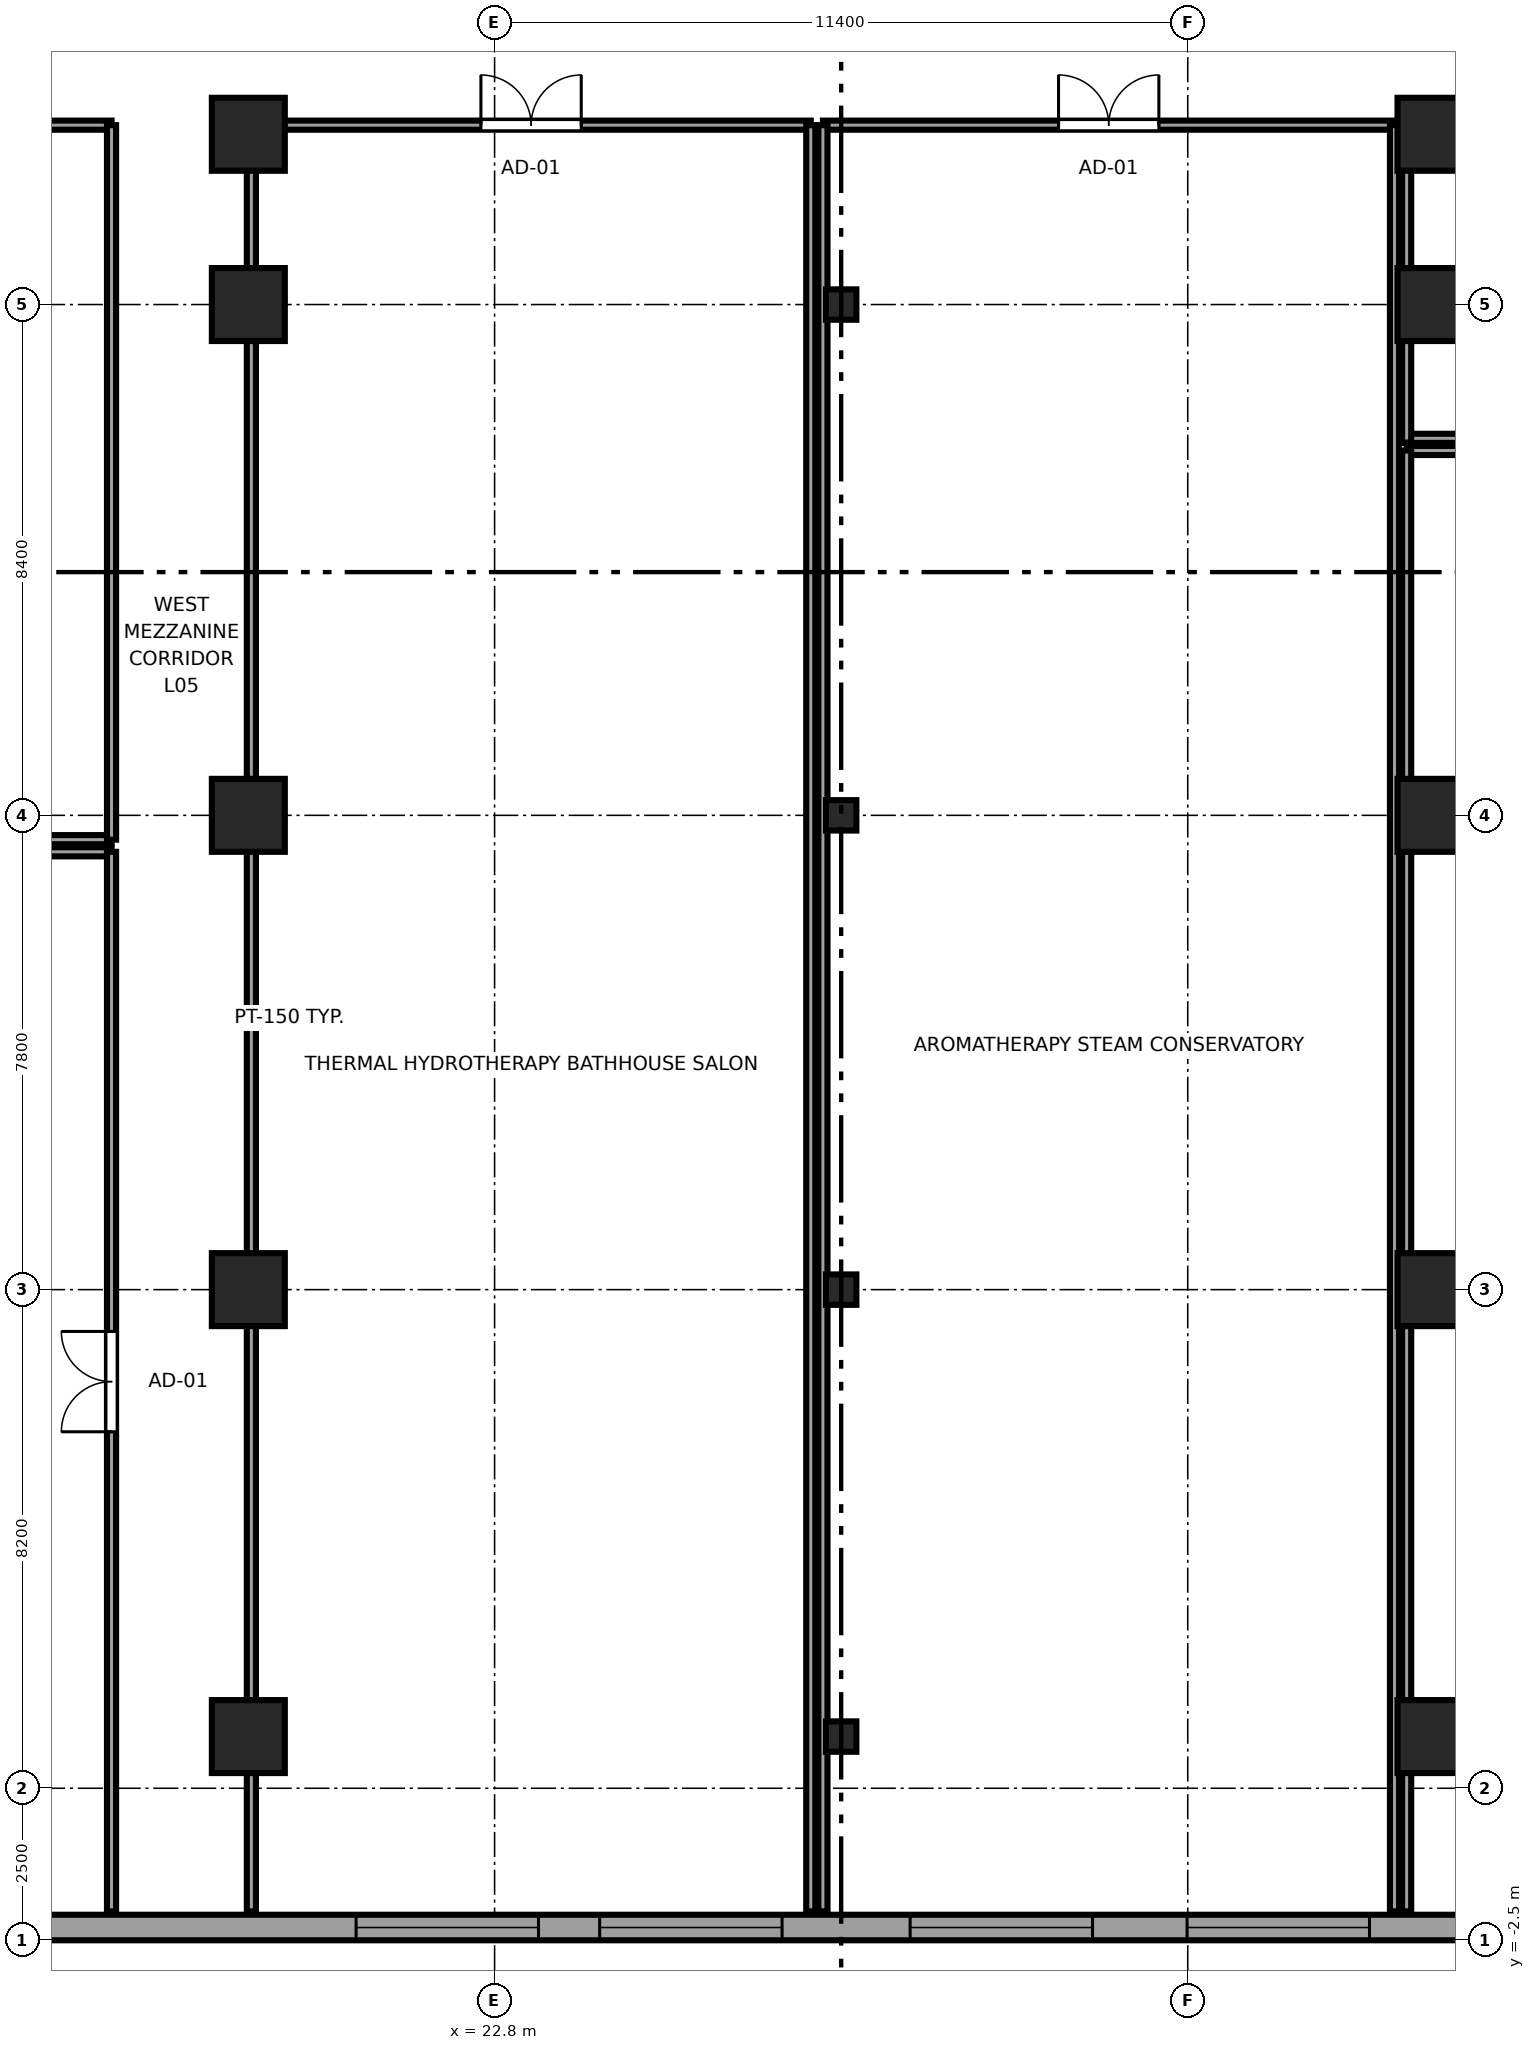
"""IFC4 building model, lengths in metres.
Left out: names, types, materials, properties, quantities, classifications, styles, units other than length and angle.
Written with IfcOpenShell. Run it as: python <this file> out.ifc"""

import sys

from ifc_helpers import new_model, si_unit, direction, frame, frame_2d, origin, origin_2d, place, context, subcontext, project, spatial, rectangle, i_section, extrude, source, transform, mapped, element, fill, save


model = new_model("IFC4")
c1 = context("Model", 3, precision=1e-05, world=origin(), true_north=direction((0.0, 1.0)))
c2 = subcontext(c1, "Body", "Model", "MODEL_VIEW")
j1 = project(units=[si_unit("LENGTHUNIT", "METRE"), si_unit("PLANEANGLEUNIT", "RADIAN")], contexts=[c1])
p1 = place(None, origin())
s1 = spatial("IfcSite", under=j1, at=p1, CompositionType="ELEMENT")
p2 = place(p1, origin())
s2 = spatial("IfcBuilding", under=s1, at=p2, CompositionType="ELEMENT")
p3 = place(p2, frame((0.0, 0.0, 26.8)))
s3 = spatial("IfcBuildingStorey", under=s2, at=p3, CompositionType="ELEMENT", Elevation=26.8)
m1 = source(origin(), c2, "Body", "SweptSolid", [
    extrude(rectangle(XDim=1.2, YDim=1.2, at=origin_2d()), origin(), (0.0, 0.0, 1.0), 5.2),
])
for number, where, z_axis, x_axis in (
    (1, (18.75, 0.85, 0.0), (0.0, 0.0, 1.0), (1.0, 0.0, 0.0)),
    (2, (38.25, 0.85, 0.0), (0.0, 0.0, 1.0), (1.0, 0.0, 0.0)),
    (3, (18.75, 8.2, 0.0), (0.0, 0.0, 1.0), (1.0, 0.0, 0.0)),
    (4, (38.25, 8.2, 0.0), (0.0, 0.0, 1.0), (1.0, 0.0, 0.0)),
    (5, (18.75, 16.0, 0.0), (0.0, 0.0, 1.0), (1.0, 0.0, 0.0)),
    (6, (38.25, 16.0, 0.0), (0.0, 0.0, 1.0), (1.0, 0.0, 0.0)),
    (7, (18.75, 24.4, 0.0), (0.0, 0.0, 1.0), (1.0, 0.0, 0.0)),
    (8, (38.25, 24.4, 0.0), (0.0, 0.0, 1.0), (1.0, 0.0, 0.0)),
    (9, (18.75, 27.2, 0.0), (0.0, 0.0, 1.0), (1.0, 0.0, 0.0)),
    (10, (38.25, 27.2, 0.0), (0.0, 0.0, 1.0), (1.0, 0.0, 0.0)),
):
    element("IfcColumn", number, at=place(p3, frame(where, z_axis=z_axis, x_axis=x_axis)), inside=s3, PredefinedType="COLUMN", context=c2, shape_type="MappedRepresentation", body=[
        mapped(m1, transform((0.0, 0.0, 0.0), x_axis=(1.0, 0.0, 0.0), y_axis=(0.0, 1.0, 0.0), z_axis=(0.0, 0.0, 1.0), scale=1.0)),
    ])
m2 = source(origin(), c2, "Body", "SweptSolid", [
    extrude(i_section(OverallWidth=0.5, OverallDepth=0.5, WebThickness=0.028, FlangeThickness=0.045, at=origin_2d()), origin(), (0.0, 0.0, 1.0), 5.2),
])
for number, where, z_axis, x_axis in (
    (11, (28.5, 0.85, 0.0), (0.0, 0.0, 1.0), (1.0, 0.0, 0.0)),
    (12, (28.5, 8.2, 0.0), (0.0, 0.0, 1.0), (1.0, 0.0, 0.0)),
    (13, (28.5, 16.0, 0.0), (0.0, 0.0, 1.0), (1.0, 0.0, 0.0)),
    (14, (28.5, 24.4, 0.0), (0.0, 0.0, 1.0), (1.0, 0.0, 0.0)),
):
    element("IfcColumn", number, at=place(p3, frame(where, z_axis=z_axis, x_axis=x_axis)), inside=s3, PredefinedType="COLUMN", context=c2, shape_type="MappedRepresentation", body=[
        mapped(m2, transform((0.0, 0.0, 0.0), x_axis=(1.0, 0.0, 0.0), y_axis=(0.0, 1.0, 0.0), z_axis=(0.0, 0.0, 1.0), scale=1.0)),
    ])
p4 = place(p3, frame((-8.19, -2.29, 0.0), z_axis=(0.0, 0.0, 1.0), x_axis=(1.0, 0.0, 0.0)))
e15 = element("IfcWall", 15, at=p4, inside=s3, PredefinedType="SOLIDWALL", context=c2, shape_type="SweptSolid", body=[
    extrude(rectangle(XDim=64.98, YDim=0.42, at=frame_2d((32.49, 0.0))), origin(), (0.0, 0.0, 1.0), 4.94),
])
p5 = place(p4, frame((1.378, 0.0, 0.65)))
e16 = element("IfcOpeningElement", 16, at=p5, cuts=e15, PredefinedType="OPENING", context=c2, shape_type="SweptSolid", body=[
    extrude(rectangle(XDim=3.0, YDim=2.5, at=frame_2d((1.5, 1.25))), frame((0.0, 0.22, 0.0), z_axis=(0.0, -1.0, 0.0), x_axis=(1.0, 0.0, 0.0)), (0.0, 0.0, 1.0), 0.44),
])
p6 = place(p4, frame((4.884, 0.0, 0.65)))
e17 = element("IfcOpeningElement", 17, at=p6, cuts=e15, PredefinedType="OPENING", context=c2, shape_type="SweptSolid", body=[
    extrude(rectangle(XDim=3.0, YDim=2.5, at=frame_2d((1.5, 1.25))), frame((0.0, 0.22, 0.0), z_axis=(0.0, -1.0, 0.0), x_axis=(1.0, 0.0, 0.0)), (0.0, 0.0, 1.0), 0.44),
])
p7 = place(p4, frame((10.489, 0.0, 0.65)))
e18 = element("IfcOpeningElement", 18, at=p7, cuts=e15, PredefinedType="OPENING", context=c2, shape_type="SweptSolid", body=[
    extrude(rectangle(XDim=3.0, YDim=2.5, at=frame_2d((1.5, 1.25))), frame((0.0, 0.22, 0.0), z_axis=(0.0, -1.0, 0.0), x_axis=(1.0, 0.0, 0.0)), (0.0, 0.0, 1.0), 0.44),
])
p8 = place(p4, frame((19.601, 0.0, 0.65)))
e19 = element("IfcOpeningElement", 19, at=p8, cuts=e15, PredefinedType="OPENING", context=c2, shape_type="SweptSolid", body=[
    extrude(rectangle(XDim=3.0, YDim=2.5, at=frame_2d((1.5, 1.25))), frame((0.0, 0.22, 0.0), z_axis=(0.0, -1.0, 0.0), x_axis=(1.0, 0.0, 0.0)), (0.0, 0.0, 1.0), 0.44),
])
p9 = place(p4, frame((28.712, 0.0, 0.65)))
e20 = element("IfcOpeningElement", 20, at=p9, cuts=e15, PredefinedType="OPENING", context=c2, shape_type="SweptSolid", body=[
    extrude(rectangle(XDim=3.0, YDim=2.5, at=frame_2d((1.5, 1.25))), frame((0.0, 0.22, 0.0), z_axis=(0.0, -1.0, 0.0), x_axis=(1.0, 0.0, 0.0)), (0.0, 0.0, 1.0), 0.44),
])
p10 = place(p4, frame((32.718, 0.0, 0.65)))
e21 = element("IfcOpeningElement", 21, at=p10, cuts=e15, PredefinedType="OPENING", context=c2, shape_type="SweptSolid", body=[
    extrude(rectangle(XDim=3.0, YDim=2.5, at=frame_2d((1.5, 1.25))), frame((0.0, 0.22, 0.0), z_axis=(0.0, -1.0, 0.0), x_axis=(1.0, 0.0, 0.0)), (0.0, 0.0, 1.0), 0.44),
])
p11 = place(p4, frame((37.824, 0.0, 0.65)))
e22 = element("IfcOpeningElement", 22, at=p11, cuts=e15, PredefinedType="OPENING", context=c2, shape_type="SweptSolid", body=[
    extrude(rectangle(XDim=3.0, YDim=2.5, at=frame_2d((1.5, 1.25))), frame((0.0, 0.22, 0.0), z_axis=(0.0, -1.0, 0.0), x_axis=(1.0, 0.0, 0.0)), (0.0, 0.0, 1.0), 0.44),
])
p12 = place(p4, frame((42.379, 0.0, 0.65)))
e23 = element("IfcOpeningElement", 23, at=p12, cuts=e15, PredefinedType="OPENING", context=c2, shape_type="SweptSolid", body=[
    extrude(rectangle(XDim=3.0, YDim=2.5, at=frame_2d((1.5, 1.25))), frame((0.0, 0.22, 0.0), z_axis=(0.0, -1.0, 0.0), x_axis=(1.0, 0.0, 0.0)), (0.0, 0.0, 1.0), 0.44),
])
p13 = place(p4, frame((46.935, 0.0, 0.65)))
e24 = element("IfcOpeningElement", 24, at=p13, cuts=e15, PredefinedType="OPENING", context=c2, shape_type="SweptSolid", body=[
    extrude(rectangle(XDim=3.0, YDim=2.5, at=frame_2d((1.5, 1.25))), frame((0.0, 0.22, 0.0), z_axis=(0.0, -1.0, 0.0), x_axis=(1.0, 0.0, 0.0)), (0.0, 0.0, 1.0), 0.44),
])
p14 = place(p4, frame((51.491, 0.0, 0.65)))
e25 = element("IfcOpeningElement", 25, at=p14, cuts=e15, PredefinedType="OPENING", context=c2, shape_type="SweptSolid", body=[
    extrude(rectangle(XDim=3.0, YDim=2.5, at=frame_2d((1.5, 1.25))), frame((0.0, 0.22, 0.0), z_axis=(0.0, -1.0, 0.0), x_axis=(1.0, 0.0, 0.0)), (0.0, 0.0, 1.0), 0.44),
])
p15 = place(p4, frame((60.602, 0.0, 0.65)))
e26 = element("IfcOpeningElement", 26, at=p15, cuts=e15, PredefinedType="OPENING", context=c2, shape_type="SweptSolid", body=[
    extrude(rectangle(XDim=3.0, YDim=2.5, at=frame_2d((1.5, 1.25))), frame((0.0, 0.22, 0.0), z_axis=(0.0, -1.0, 0.0), x_axis=(1.0, 0.0, 0.0)), (0.0, 0.0, 1.0), 0.44),
])
p16 = place(p3, frame((-7.925, 15.4, 0.0), z_axis=(0.0, 0.0, 1.0), x_axis=(1.0, 0.0, 0.0)))
e27 = element("IfcWall", 27, at=p16, inside=s3, PredefinedType="PARTITIONING", context=c2, shape_type="SweptSolid", body=[
    extrude(rectangle(XDim=24.425, YDim=0.15, at=frame_2d((12.212, 0.0))), origin(), (0.0, 0.0, 1.0), 4.94),
])
p17 = place(p3, frame((16.5, -2.025, 0.0), z_axis=(0.0, 0.0, 1.0), x_axis=(0.0, 1.0, 0.0)))
e28 = element("IfcWall", 28, at=p17, inside=s3, PredefinedType="PARTITIONING", context=c2, shape_type="SweptSolid", body=[
    extrude(rectangle(XDim=17.425, YDim=0.15, at=frame_2d((8.712, 0.0))), origin(), (0.0, 0.0, 1.0), 4.94),
])
p18 = place(p17, frame((7.887, 0.0, 0.0)))
e29 = element("IfcOpeningElement", 29, at=p18, cuts=e28, PredefinedType="OPENING", context=c2, shape_type="SweptSolid", body=[
    extrude(rectangle(XDim=1.65, YDim=2.15, at=frame_2d((0.825, 1.075))), frame((0.0, 0.085, 0.0), z_axis=(0.0, -1.0, 0.0), x_axis=(1.0, 0.0, 0.0)), (0.0, 0.0, 1.0), 0.17),
])
p19 = place(p3, frame((-7.925, 15.6, 0.0), z_axis=(0.0, 0.0, 1.0), x_axis=(1.0, 0.0, 0.0)))
e30 = element("IfcWall", 30, at=p19, inside=s3, PredefinedType="PARTITIONING", context=c2, shape_type="SweptSolid", body=[
    extrude(rectangle(XDim=24.425, YDim=0.15, at=frame_2d((12.212, 0.0))), origin(), (0.0, 0.0, 1.0), 4.94),
])
p20 = place(p3, frame((-7.925, 27.35, 0.0), z_axis=(0.0, 0.0, 1.0), x_axis=(1.0, 0.0, 0.0)))
e31 = element("IfcWall", 31, at=p20, inside=s3, PredefinedType="PARTITIONING", context=c2, shape_type="SweptSolid", body=[
    extrude(rectangle(XDim=24.425, YDim=0.15, at=frame_2d((12.212, 0.0))), origin(), (0.0, 0.0, 1.0), 4.94),
])
p21 = place(p20, frame((11.387, 0.0, 0.0)))
e32 = element("IfcOpeningElement", 32, at=p21, cuts=e31, PredefinedType="OPENING", context=c2, shape_type="SweptSolid", body=[
    extrude(rectangle(XDim=1.65, YDim=2.15, at=frame_2d((0.825, 1.075))), frame((0.0, 0.085, 0.0), z_axis=(0.0, -1.0, 0.0), x_axis=(1.0, 0.0, 0.0)), (0.0, 0.0, 1.0), 0.17),
])
p22 = place(p3, frame((16.5, 15.6, 0.0), z_axis=(0.0, 0.0, 1.0), x_axis=(0.0, 1.0, 0.0)))
e33 = element("IfcWall", 33, at=p22, inside=s3, PredefinedType="PARTITIONING", context=c2, shape_type="SweptSolid", body=[
    extrude(rectangle(XDim=11.75, YDim=0.15, at=frame_2d((5.875, 0.0))), origin(), (0.0, 0.0, 1.0), 4.94),
])
p23 = place(p3, frame((18.8, 27.35, 0.0), z_axis=(0.0, 0.0, 1.0), x_axis=(1.0, 0.0, 0.0)))
e34 = element("IfcWall", 34, at=p23, inside=s3, PredefinedType="PARTITIONING", context=c2, shape_type="SweptSolid", body=[
    extrude(rectangle(XDim=9.2, YDim=0.15, at=frame_2d((4.6, 0.0))), origin(), (0.0, 0.0, 1.0), 4.94),
])
p24 = place(p23, frame((3.775, 0.0, 0.0)))
e35 = element("IfcOpeningElement", 35, at=p24, cuts=e34, PredefinedType="OPENING", context=c2, shape_type="SweptSolid", body=[
    extrude(rectangle(XDim=1.65, YDim=2.15, at=frame_2d((0.825, 1.075))), frame((0.0, 0.085, 0.0), z_axis=(0.0, -1.0, 0.0), x_axis=(1.0, 0.0, 0.0)), (0.0, 0.0, 1.0), 0.17),
])
p25 = place(p3, frame((18.8, -2.025, 0.0), z_axis=(0.0, 0.0, 1.0), x_axis=(0.0, 1.0, 0.0)))
e36 = element("IfcWall", 36, at=p25, inside=s3, PredefinedType="PARTITIONING", context=c2, shape_type="SweptSolid", body=[
    extrude(rectangle(XDim=29.375, YDim=0.15, at=frame_2d((14.688, 0.0))), origin(), (0.0, 0.0, 1.0), 4.114),
])
p26 = place(p3, frame((28.0, -2.025, 0.0), z_axis=(0.0, 0.0, 1.0), x_axis=(0.0, 1.0, 0.0)))
e37 = element("IfcWall", 37, at=p26, inside=s3, PredefinedType="PARTITIONING", context=c2, shape_type="SweptSolid", body=[
    extrude(rectangle(XDim=29.375, YDim=0.15, at=frame_2d((14.688, 0.0))), origin(), (0.0, 0.0, 1.0), 4.94),
])
p27 = place(p3, frame((28.2, 27.35, 0.0), z_axis=(0.0, 0.0, 1.0), x_axis=(1.0, 0.0, 0.0)))
e38 = element("IfcWall", 38, at=p27, inside=s3, PredefinedType="PARTITIONING", context=c2, shape_type="SweptSolid", body=[
    extrude(rectangle(XDim=9.4, YDim=0.15, at=frame_2d((4.7, 0.0))), origin(), (0.0, 0.0, 1.0), 4.94),
])
p28 = place(p27, frame((3.875, 0.0, 0.0)))
e39 = element("IfcOpeningElement", 39, at=p28, cuts=e38, PredefinedType="OPENING", context=c2, shape_type="SweptSolid", body=[
    extrude(rectangle(XDim=1.65, YDim=2.15, at=frame_2d((0.825, 1.075))), frame((0.0, 0.085, 0.0), z_axis=(0.0, -1.0, 0.0), x_axis=(1.0, 0.0, 0.0)), (0.0, 0.0, 1.0), 0.17),
])
for number, where, z_axis, x_axis in (
    (40, (28.2, -2.025, 0.0), (0.0, 0.0, 1.0), (0.0, 1.0, 0.0)),
    (41, (37.6, -2.025, 0.0), (0.0, 0.0, 1.0), (0.0, 1.0, 0.0)),
):
    element("IfcWall", number, at=place(p3, frame(where, z_axis=z_axis, x_axis=x_axis)), inside=s3, PredefinedType="PARTITIONING", context=c2, shape_type="SweptSolid", body=[
        extrude(rectangle(XDim=29.375, YDim=0.15, at=frame_2d((14.688, 0.0))), origin(), (0.0, 0.0, 1.0), 4.94),
    ])
p29 = place(p3, frame((37.8, 22.0, 0.0), z_axis=(0.0, 0.0, 1.0), x_axis=(1.0, 0.0, 0.0)))
e42 = element("IfcWall", 42, at=p29, inside=s3, PredefinedType="PARTITIONING", context=c2, shape_type="SweptSolid", body=[
    extrude(rectangle(XDim=10.2, YDim=0.15, at=frame_2d((5.1, 0.0))), origin(), (0.0, 0.0, 1.0), 4.94),
])
p30 = place(p3, frame((37.8, -2.025, 0.0), z_axis=(0.0, 0.0, 1.0), x_axis=(0.0, 1.0, 0.0)))
e43 = element("IfcWall", 43, at=p30, inside=s3, PredefinedType="PARTITIONING", context=c2, shape_type="SweptSolid", body=[
    extrude(rectangle(XDim=24.025, YDim=0.15, at=frame_2d((12.012, 0.0))), origin(), (0.0, 0.0, 1.0), 4.94),
])
p31 = place(p3, frame((37.73, 22.2, 0.0), z_axis=(0.0, 0.0, 1.0), x_axis=(1.0, 0.0, 0.0)))
e44 = element("IfcWall", 44, at=p31, inside=s3, PredefinedType="PARTITIONING", context=c2, shape_type="SweptSolid", body=[
    extrude(rectangle(XDim=6.74, YDim=0.15, at=frame_2d((3.37, 0.0))), origin(), (0.0, 0.0, 1.0), 4.94),
])
p32 = place(p3, frame((37.73, 27.35, 0.0), z_axis=(0.0, 0.0, 1.0), x_axis=(1.0, 0.0, 0.0)))
e45 = element("IfcWall", 45, at=p32, inside=s3, PredefinedType="PARTITIONING", context=c2, shape_type="SweptSolid", body=[
    extrude(rectangle(XDim=6.74, YDim=0.15, at=frame_2d((3.37, 0.0))), origin(), (0.0, 0.0, 1.0), 4.94),
])
p33 = place(p32, frame((2.91, 0.0, 0.0)))
e46 = element("IfcOpeningElement", 46, at=p33, cuts=e45, PredefinedType="OPENING", context=c2, shape_type="SweptSolid", body=[
    extrude(rectangle(XDim=0.92, YDim=2.01, at=frame_2d((0.46, 1.005))), frame((0.0, 0.085, 0.0), z_axis=(0.0, -1.0, 0.0), x_axis=(1.0, 0.0, 0.0)), (0.0, 0.0, 1.0), 0.17),
])
p34 = place(p3, frame((37.8, 22.13, 0.0), z_axis=(0.0, 0.0, 1.0), x_axis=(0.0, 1.0, 0.0)))
e47 = element("IfcWall", 47, at=p34, inside=s3, PredefinedType="PARTITIONING", context=c2, shape_type="SweptSolid", body=[
    extrude(rectangle(XDim=5.29, YDim=0.15, at=frame_2d((2.645, 0.0))), origin(), (0.0, 0.0, 1.0), 4.94),
])
m3 = source(origin(), c2, "Body", "SweptSolid", [
    extrude(rectangle(XDim=3.0, YDim=2.5, at=frame_2d((1.5, 1.25))), frame((0.0, 0.09, 0.0), z_axis=(0.0, -1.0, 0.0), x_axis=(1.0, 0.0, 0.0)), (0.0, 0.0, 1.0), 0.06),
])
p35 = place(p9, origin())
e48 = element("IfcWindow", 48, at=p35, inside=s3, PartitioningType="TRIPLE_PANEL_HORIZONTAL", PredefinedType="WINDOW", context=c2, shape_type="MappedRepresentation", body=[
    mapped(m3, transform((0.0, 0.0, 0.0), x_axis=(1.0, 0.0, 0.0), y_axis=(0.0, 1.0, 0.0), z_axis=(0.0, 0.0, 1.0), scale=1.0)),
])
fill(e20, e48)
p36 = place(p10, origin())
e49 = element("IfcWindow", 49, at=p36, inside=s3, PartitioningType="TRIPLE_PANEL_HORIZONTAL", PredefinedType="WINDOW", context=c2, shape_type="MappedRepresentation", body=[
    mapped(m3, transform((0.0, 0.0, 0.0), x_axis=(1.0, 0.0, 0.0), y_axis=(0.0, 1.0, 0.0), z_axis=(0.0, 0.0, 1.0), scale=1.0)),
])
fill(e21, e49)
p37 = place(p11, origin())
e50 = element("IfcWindow", 50, at=p37, inside=s3, PartitioningType="TRIPLE_PANEL_HORIZONTAL", PredefinedType="WINDOW", context=c2, shape_type="MappedRepresentation", body=[
    mapped(m3, transform((0.0, 0.0, 0.0), x_axis=(1.0, 0.0, 0.0), y_axis=(0.0, 1.0, 0.0), z_axis=(0.0, 0.0, 1.0), scale=1.0)),
])
fill(e22, e50)
p38 = place(p12, origin())
e51 = element("IfcWindow", 51, at=p38, inside=s3, PartitioningType="TRIPLE_PANEL_HORIZONTAL", PredefinedType="WINDOW", context=c2, shape_type="MappedRepresentation", body=[
    mapped(m3, transform((0.0, 0.0, 0.0), x_axis=(1.0, 0.0, 0.0), y_axis=(0.0, 1.0, 0.0), z_axis=(0.0, 0.0, 1.0), scale=1.0)),
])
fill(e23, e51)
m4 = source(origin(), c2, "Body", "SweptSolid", [
    extrude(rectangle(XDim=1.65, YDim=2.15, at=frame_2d((0.825, 1.075))), frame((0.0, 0.025, 0.0), z_axis=(0.0, -1.0, 0.0), x_axis=(1.0, 0.0, 0.0)), (0.0, 0.0, 1.0), 0.05),
])
p39 = place(p18, origin())
e52 = element("IfcDoor", 52, at=p39, inside=s3, OperationType="DOUBLE_DOOR_SINGLE_SWING", PredefinedType="DOOR", context=c2, shape_type="MappedRepresentation", body=[
    mapped(m4, transform((0.0, 0.0, 0.0), x_axis=(1.0, 0.0, 0.0), y_axis=(0.0, 1.0, 0.0), z_axis=(0.0, 0.0, 1.0), scale=1.0)),
])
fill(e29, e52)
p40 = place(p24, origin())
e53 = element("IfcDoor", 53, at=p40, inside=s3, OperationType="DOUBLE_DOOR_SINGLE_SWING", PredefinedType="DOOR", context=c2, shape_type="MappedRepresentation", body=[
    mapped(m4, transform((0.0, 0.0, 0.0), x_axis=(1.0, 0.0, 0.0), y_axis=(0.0, 1.0, 0.0), z_axis=(0.0, 0.0, 1.0), scale=1.0)),
])
fill(e35, e53)
p41 = place(p28, origin())
e54 = element("IfcDoor", 54, at=p41, inside=s3, OperationType="DOUBLE_DOOR_SINGLE_SWING", PredefinedType="DOOR", context=c2, shape_type="MappedRepresentation", body=[
    mapped(m4, transform((0.0, 0.0, 0.0), x_axis=(1.0, 0.0, 0.0), y_axis=(0.0, 1.0, 0.0), z_axis=(0.0, 0.0, 1.0), scale=1.0)),
])
fill(e39, e54)
save(model, sys.argv[1])
